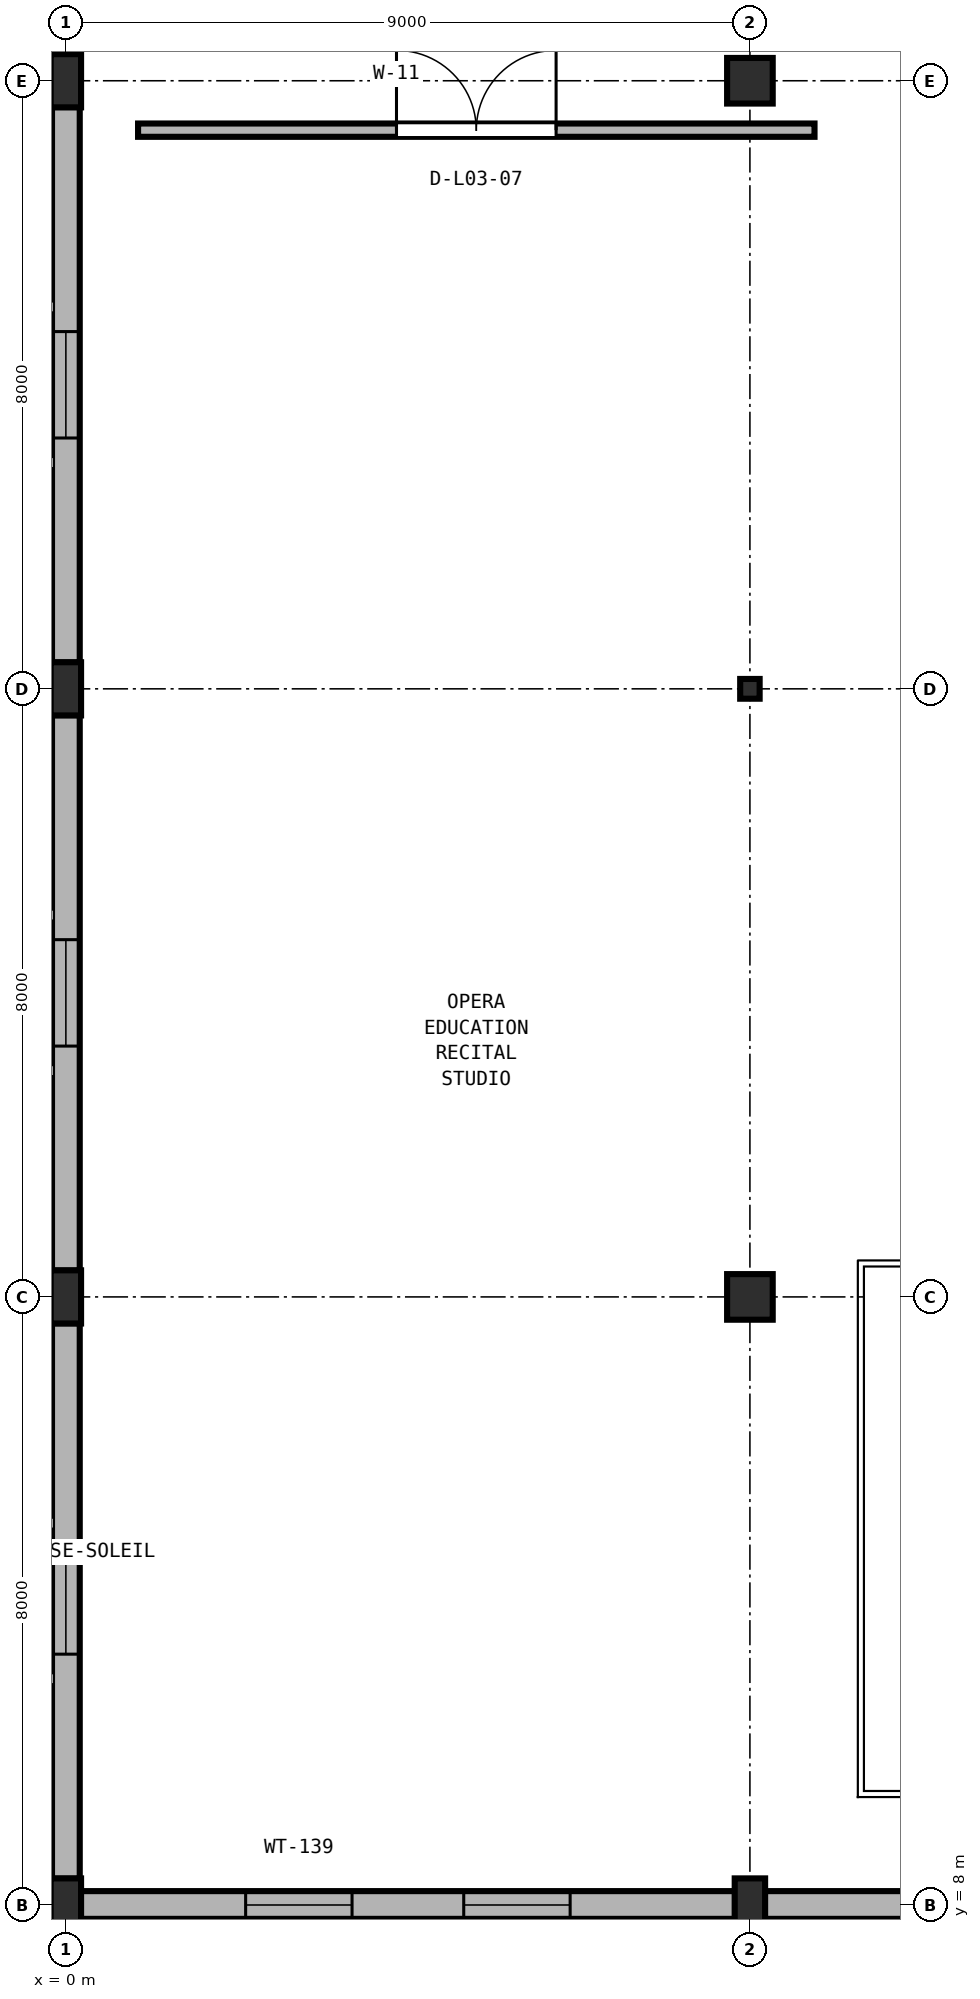
"""IFC4 building model, lengths in metres.
Left out: names, types, materials, properties, quantities, classifications, styles, units other than length and angle.
Written with IfcOpenShell. Run it as: python <this file> out.ifc"""

import sys

from ifc_helpers import new_model, si_unit, direction, frame, frame_2d, origin, origin_2d, place, context, subcontext, project, spatial, rectangle, i_section, extrude, element, fill, save


model = new_model("IFC4")
c1 = context("Model", 3, precision=1e-05, world=origin(), true_north=direction((0.0, 1.0)))
c2 = subcontext(c1, "Body", "Model", "MODEL_VIEW")
j1 = project(units=[si_unit("LENGTHUNIT", "METRE"), si_unit("PLANEANGLEUNIT", "RADIAN")], contexts=[c1])
p1 = place(None, origin())
s1 = spatial("IfcSite", under=j1, at=p1, CompositionType="ELEMENT")
p2 = place(p1, origin())
s2 = spatial("IfcBuilding", under=s1, at=p2, CompositionType="ELEMENT")
p3 = place(p2, frame((0.0, 0.0, 14.7)))
s3 = spatial("IfcBuildingStorey", under=s2, at=p3, CompositionType="ELEMENT", Elevation=14.7)
for number, where, z_axis, x_axis in (
    (1, (0.0, 8.0, 0.0), (0.0, 0.0, 1.0), (1.0, 0.0, 0.0)),
    (2, (0.0, 16.0, 0.0), (0.0, 0.0, 1.0), (1.0, 0.0, 0.0)),
    (3, (0.0, 24.0, 0.0), (0.0, 0.0, 1.0), (1.0, 0.0, 0.0)),
    (4, (0.0, 32.0, 0.0), (0.0, 0.0, 1.0), (1.0, 0.0, 0.0)),
    (5, (9.0, 8.0, 0.0), (0.0, 0.0, 1.0), (1.0, 0.0, 0.0)),
):
    element("IfcColumn", number, at=place(p3, frame(where, z_axis=z_axis, x_axis=x_axis)), inside=s3, PredefinedType="PILASTER", context=c2, shape_type="SweptSolid", body=[
        extrude(rectangle(XDim=0.4, YDim=0.7, at=origin_2d()), origin(), (0.0, 0.0, 1.0), 4.25),
    ])
p4 = place(p3, frame((9.0, 16.0, 0.0), z_axis=(0.0, 0.0, 1.0), x_axis=(1.0, 0.0, 0.0)))
e6 = element("IfcColumn", 6, at=p4, inside=s3, PredefinedType="COLUMN", context=c2, shape_type="SweptSolid", body=[
    extrude(rectangle(XDim=0.6, YDim=0.6, at=origin_2d()), origin(), (0.0, 0.0, 1.0), 4.25),
])
p5 = place(p3, frame((9.0, 24.0, 0.0), z_axis=(0.0, 0.0, 1.0), x_axis=(1.0, 0.0, 0.0)))
e7 = element("IfcColumn", 7, at=p5, inside=s3, PredefinedType="COLUMN", context=c2, shape_type="SweptSolid", body=[
    extrude(i_section(OverallWidth=0.256, OverallDepth=0.26, WebThickness=0.01, FlangeThickness=0.017, FilletRadius=0.014, at=origin_2d()), origin(), (0.0, 0.0, 1.0), 4.25),
])
p6 = place(p3, frame((9.0, 32.0, 0.0), z_axis=(0.0, 0.0, 1.0), x_axis=(1.0, 0.0, 0.0)))
e8 = element("IfcColumn", 8, at=p6, inside=s3, PredefinedType="COLUMN", context=c2, shape_type="SweptSolid", body=[
    extrude(rectangle(XDim=0.6, YDim=0.6, at=origin_2d()), origin(), (0.0, 0.0, 1.0), 4.25),
])
p7 = place(p3, frame((0.196, 8.0, 0.0), z_axis=(0.0, 0.0, 1.0), x_axis=(1.0, 0.0, 0.0)))
e9 = element("IfcWall", 9, at=p7, inside=s3, PredefinedType="SOLIDWALL", context=c2, shape_type="SweptSolid", body=[
    extrude(rectangle(XDim=8.608, YDim=0.365, at=frame_2d((4.304, 0.0))), origin(), (0.0, 0.0, 1.0), 4.25),
])
p8 = place(p7, frame((2.169, 0.0, 0.85)))
e10 = element("IfcOpeningElement", 10, at=p8, cuts=e9, PredefinedType="OPENING", context=c2, shape_type="SweptSolid", body=[
    extrude(rectangle(XDim=1.4, YDim=2.25, at=frame_2d((0.7, 1.125))), frame((0.0, 0.192, 0.0), z_axis=(0.0, -1.0, 0.0), x_axis=(1.0, 0.0, 0.0)), (0.0, 0.0, 1.0), 0.385),
])
p9 = place(p7, frame((5.039, 0.0, 0.85)))
e11 = element("IfcOpeningElement", 11, at=p9, cuts=e9, PredefinedType="OPENING", context=c2, shape_type="SweptSolid", body=[
    extrude(rectangle(XDim=1.4, YDim=2.25, at=frame_2d((0.7, 1.125))), frame((0.0, 0.192, 0.0), z_axis=(0.0, -1.0, 0.0), x_axis=(1.0, 0.0, 0.0)), (0.0, 0.0, 1.0), 0.385),
])
p10 = place(p3, frame((9.196, 8.0, 0.0), z_axis=(0.0, 0.0, 1.0), x_axis=(1.0, 0.0, 0.0)))
e12 = element("IfcWall", 12, at=p10, inside=s3, PredefinedType="SOLIDWALL", context=c2, shape_type="SweptSolid", body=[
    extrude(rectangle(XDim=8.608, YDim=0.365, at=frame_2d((4.304, 0.0))), origin(), (0.0, 0.0, 1.0), 4.25),
])
p11 = place(p10, frame((2.169, 0.0, 0.85)))
e13 = element("IfcOpeningElement", 13, at=p11, cuts=e12, PredefinedType="OPENING", context=c2, shape_type="SweptSolid", body=[
    extrude(rectangle(XDim=1.4, YDim=2.25, at=frame_2d((0.7, 1.125))), frame((0.0, 0.192, 0.0), z_axis=(0.0, -1.0, 0.0), x_axis=(1.0, 0.0, 0.0)), (0.0, 0.0, 1.0), 0.385),
])
p12 = place(p10, frame((5.039, 0.0, 0.85)))
e14 = element("IfcOpeningElement", 14, at=p12, cuts=e12, PredefinedType="OPENING", context=c2, shape_type="SweptSolid", body=[
    extrude(rectangle(XDim=1.4, YDim=2.25, at=frame_2d((0.7, 1.125))), frame((0.0, 0.192, 0.0), z_axis=(0.0, -1.0, 0.0), x_axis=(1.0, 0.0, 0.0)), (0.0, 0.0, 1.0), 0.385),
])
p13 = place(p3, frame((0.0, 8.346, 0.0), z_axis=(0.0, 0.0, 1.0), x_axis=(0.0, 1.0, 0.0)))
e15 = element("IfcWall", 15, at=p13, inside=s3, PredefinedType="SOLIDWALL", context=c2, shape_type="SweptSolid", body=[
    extrude(rectangle(XDim=7.308, YDim=0.365, at=frame_2d((3.654, 0.0))), origin(), (0.0, 0.0, 1.0), 3.804),
])
p14 = place(p13, frame((2.954, 0.0, 0.85)))
e16 = element("IfcOpeningElement", 16, at=p14, cuts=e15, PredefinedType="OPENING", context=c2, shape_type="SweptSolid", body=[
    extrude(rectangle(XDim=1.4, YDim=2.25, at=frame_2d((0.7, 1.125))), frame((0.0, 0.192, 0.0), z_axis=(0.0, -1.0, 0.0), x_axis=(1.0, 0.0, 0.0)), (0.0, 0.0, 1.0), 0.385),
])
p15 = place(p3, frame((0.0, 16.346, 0.0), z_axis=(0.0, 0.0, 1.0), x_axis=(0.0, 1.0, 0.0)))
e17 = element("IfcWall", 17, at=p15, inside=s3, PredefinedType="SOLIDWALL", context=c2, shape_type="SweptSolid", body=[
    extrude(rectangle(XDim=7.308, YDim=0.365, at=frame_2d((3.654, 0.0))), origin(), (0.0, 0.0, 1.0), 3.804),
])
p16 = place(p15, frame((2.954, 0.0, 0.85)))
e18 = element("IfcOpeningElement", 18, at=p16, cuts=e17, PredefinedType="OPENING", context=c2, shape_type="SweptSolid", body=[
    extrude(rectangle(XDim=1.4, YDim=2.25, at=frame_2d((0.7, 1.125))), frame((0.0, 0.192, 0.0), z_axis=(0.0, -1.0, 0.0), x_axis=(1.0, 0.0, 0.0)), (0.0, 0.0, 1.0), 0.385),
])
p17 = place(p3, frame((0.0, 24.346, 0.0), z_axis=(0.0, 0.0, 1.0), x_axis=(0.0, 1.0, 0.0)))
e19 = element("IfcWall", 19, at=p17, inside=s3, PredefinedType="SOLIDWALL", context=c2, shape_type="SweptSolid", body=[
    extrude(rectangle(XDim=7.308, YDim=0.365, at=frame_2d((3.654, 0.0))), origin(), (0.0, 0.0, 1.0), 3.804),
])
p18 = place(p17, frame((2.954, 0.0, 0.85)))
e20 = element("IfcOpeningElement", 20, at=p18, cuts=e19, PredefinedType="OPENING", context=c2, shape_type="SweptSolid", body=[
    extrude(rectangle(XDim=1.4, YDim=2.25, at=frame_2d((0.7, 1.125))), frame((0.0, 0.192, 0.0), z_axis=(0.0, -1.0, 0.0), x_axis=(1.0, 0.0, 0.0)), (0.0, 0.0, 1.0), 0.385),
])
p19 = place(p3, frame((0.0, 32.346, 0.0), z_axis=(0.0, 0.0, 1.0), x_axis=(0.0, 1.0, 0.0)))
e21 = element("IfcWall", 21, at=p19, inside=s3, PredefinedType="SOLIDWALL", context=c2, shape_type="SweptSolid", body=[
    extrude(rectangle(XDim=7.308, YDim=0.365, at=frame_2d((3.654, 0.0))), origin(), (0.0, 0.0, 1.0), 3.842),
])
p20 = place(p19, frame((2.954, 0.0, 0.85)))
e22 = element("IfcOpeningElement", 22, at=p20, cuts=e21, PredefinedType="OPENING", context=c2, shape_type="SweptSolid", body=[
    extrude(rectangle(XDim=1.4, YDim=2.25, at=frame_2d((0.7, 1.125))), frame((0.0, 0.192, 0.0), z_axis=(0.0, -1.0, 0.0), x_axis=(1.0, 0.0, 0.0)), (0.0, 0.0, 1.0), 0.385),
])
p21 = place(p3, frame((0.95, 31.35, 0.0), z_axis=(0.0, 0.0, 1.0), x_axis=(1.0, 0.0, 0.0)))
e23 = element("IfcWall", 23, at=p21, inside=s3, PredefinedType="PARTITIONING", context=c2, shape_type="SweptSolid", body=[
    extrude(rectangle(XDim=8.9, YDim=0.175, at=frame_2d((4.45, 0.0))), origin(), (0.0, 0.0, 1.0), 4.2),
])
p22 = place(p21, frame((3.4, 0.0, 0.0)))
e24 = element("IfcOpeningElement", 24, at=p22, cuts=e23, PredefinedType="OPENING", context=c2, shape_type="SweptSolid", body=[
    extrude(rectangle(XDim=2.1, YDim=2.42, at=frame_2d((1.05, 1.21))), frame((0.0, 0.097, 0.0), z_axis=(0.0, -1.0, 0.0), x_axis=(1.0, 0.0, 0.0)), (0.0, 0.0, 1.0), 0.195),
])
p23 = place(p8, origin())
e25 = element("IfcWindow", 25, at=p23, inside=s3, PartitioningType="SINGLE_PANEL", PredefinedType="WINDOW", context=c2, shape_type="SweptSolid", body=[
    extrude(rectangle(XDim=1.4, YDim=2.25, at=frame_2d((0.7, 1.125))), frame((0.0, 0.03, 0.0), z_axis=(0.0, -1.0, 0.0), x_axis=(1.0, 0.0, 0.0)), (0.0, 0.0, 1.0), 0.06),
])
fill(e10, e25)
p24 = place(p9, origin())
e26 = element("IfcWindow", 26, at=p24, inside=s3, PartitioningType="SINGLE_PANEL", PredefinedType="WINDOW", context=c2, shape_type="SweptSolid", body=[
    extrude(rectangle(XDim=1.4, YDim=2.25, at=frame_2d((0.7, 1.125))), frame((0.0, 0.03, 0.0), z_axis=(0.0, -1.0, 0.0), x_axis=(1.0, 0.0, 0.0)), (0.0, 0.0, 1.0), 0.06),
])
fill(e11, e26)
p25 = place(p14, origin())
e27 = element("IfcWindow", 27, at=p25, inside=s3, PartitioningType="SINGLE_PANEL", PredefinedType="WINDOW", context=c2, shape_type="SweptSolid", body=[
    extrude(rectangle(XDim=1.4, YDim=2.25, at=frame_2d((0.7, 1.125))), frame((0.0, 0.03, 0.0), z_axis=(0.0, -1.0, 0.0), x_axis=(1.0, 0.0, 0.0)), (0.0, 0.0, 1.0), 0.06),
])
fill(e16, e27)
p26 = place(p16, origin())
e28 = element("IfcWindow", 28, at=p26, inside=s3, PartitioningType="SINGLE_PANEL", PredefinedType="WINDOW", context=c2, shape_type="SweptSolid", body=[
    extrude(rectangle(XDim=1.4, YDim=2.25, at=frame_2d((0.7, 1.125))), frame((0.0, 0.03, 0.0), z_axis=(0.0, -1.0, 0.0), x_axis=(1.0, 0.0, 0.0)), (0.0, 0.0, 1.0), 0.06),
])
fill(e18, e28)
p27 = place(p18, origin())
e29 = element("IfcWindow", 29, at=p27, inside=s3, PartitioningType="SINGLE_PANEL", PredefinedType="WINDOW", context=c2, shape_type="SweptSolid", body=[
    extrude(rectangle(XDim=1.4, YDim=2.25, at=frame_2d((0.7, 1.125))), frame((0.0, 0.03, 0.0), z_axis=(0.0, -1.0, 0.0), x_axis=(1.0, 0.0, 0.0)), (0.0, 0.0, 1.0), 0.06),
])
fill(e20, e29)
p28 = place(p22, origin())
e30 = element("IfcDoor", 30, at=p28, inside=s3, OperationType="DOUBLE_DOOR_SINGLE_SWING", PredefinedType="DOOR", context=c2, shape_type="SweptSolid", body=[
    extrude(rectangle(XDim=2.1, YDim=2.42, at=frame_2d((1.05, 1.21))), frame((0.0, 0.025, 0.0), z_axis=(0.0, -1.0, 0.0), x_axis=(1.0, 0.0, 0.0)), (0.0, 0.0, 1.0), 0.05),
])
fill(e24, e30)
save(model, sys.argv[1])
